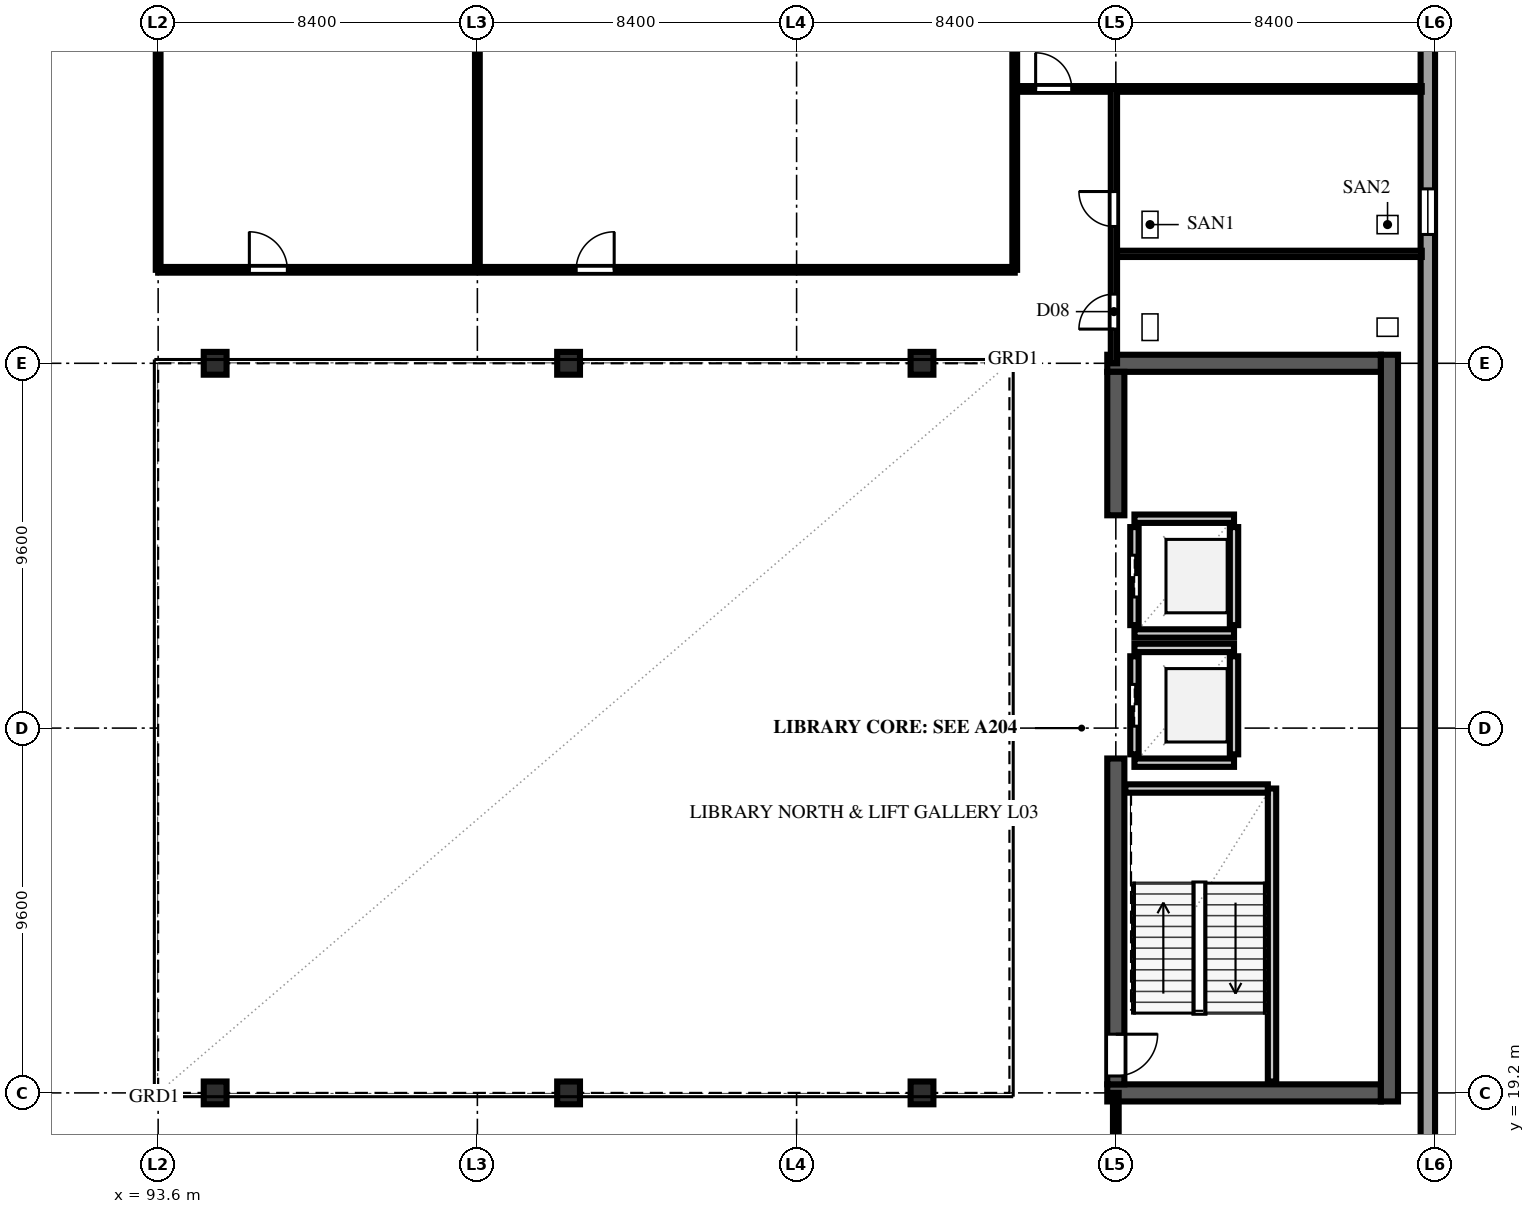
"""IFC4 building model, lengths in metres.
Left out: names, types, materials, properties, quantities, classifications, styles, units other than length and angle.
Written with IfcOpenShell. Run it as: python <this file> out.ifc"""

import sys

from ifc_helpers import new_model, si_unit, direction, frame, frame_2d, origin, origin_2d, place, context, subcontext, project, spatial, rectangle, extrude, element, fill, save


model = new_model("IFC4")
c1 = context("Model", 3, precision=1e-05, world=origin(), true_north=direction((0.0, 1.0)))
c2 = subcontext(c1, "Body", "Model", "MODEL_VIEW")
j1 = project(units=[si_unit("LENGTHUNIT", "METRE"), si_unit("PLANEANGLEUNIT", "RADIAN")], contexts=[c1])
p1 = place(None, origin())
s1 = spatial("IfcSite", under=j1, at=p1, CompositionType="ELEMENT")
p2 = place(p1, origin())
s2 = spatial("IfcBuilding", under=s1, at=p2, CompositionType="ELEMENT")
p3 = place(p2, frame((0.0, 0.0, 15.0)))
s3 = spatial("IfcBuildingStorey", under=s2, at=p3, CompositionType="ELEMENT", Elevation=15.0)
for number, where, z_axis, x_axis in (
    (1, (118.575, 19.2, 0.0), (0.0, 0.0, 1.0), (1.0, 0.0, 0.0)),
    (2, (118.575, 38.4, 0.0), (0.0, 0.0, 1.0), (1.0, 0.0, 0.0)),
):
    element("IfcWall", number, at=place(p3, frame(where, z_axis=z_axis, x_axis=x_axis)), inside=s3, PredefinedType="SHEAR", context=c2, shape_type="SweptSolid", body=[
        extrude(rectangle(XDim=7.2, YDim=0.45, at=frame_2d((3.6, 0.0))), origin(), (0.0, 0.0, 1.0), 4.25),
    ])
p4 = place(p3, frame((126.0, 18.975, 0.0), z_axis=(0.0, 0.0, 1.0), x_axis=(0.0, 1.0, 0.0)))
e3 = element("IfcWall", 3, at=p4, inside=s3, PredefinedType="SHEAR", context=c2, shape_type="SweptSolid", body=[
    extrude(rectangle(XDim=19.65, YDim=0.45, at=frame_2d((9.825, 0.0))), origin(), (0.0, 0.0, 1.0), 4.25),
])
p5 = place(p3, frame((118.8, 19.425, 0.0), z_axis=(0.0, 0.0, 1.0), x_axis=(0.0, 1.0, 0.0)))
e4 = element("IfcWall", 4, at=p5, inside=s3, PredefinedType="SHEAR", context=c2, shape_type="SweptSolid", body=[
    extrude(rectangle(XDim=8.575, YDim=0.45, at=frame_2d((4.288, 0.0))), origin(), (0.0, 0.0, 1.0), 4.25),
])
p6 = place(p5, frame((0.22, 0.0, 0.0)))
e5 = element("IfcOpeningElement", 5, at=p6, cuts=e4, PredefinedType="OPENING", context=c2, shape_type="SweptSolid", body=[
    extrude(rectangle(XDim=1.1, YDim=2.2, at=frame_2d((0.55, 1.1))), frame((0.0, 0.237, 0.0), z_axis=(0.0, -1.0, 0.0), x_axis=(1.0, 0.0, 0.0)), (0.0, 0.0, 1.0), 0.474),
])
p7 = place(p3, frame((118.8, 34.4, 0.0), z_axis=(0.0, 0.0, 1.0), x_axis=(0.0, 1.0, 0.0)))
e6 = element("IfcWall", 6, at=p7, inside=s3, PredefinedType="SHEAR", context=c2, shape_type="SweptSolid", body=[
    extrude(rectangle(XDim=3.775, YDim=0.45, at=frame_2d((1.888, 0.0))), origin(), (0.0, 0.0, 1.0), 4.25),
])
for number, where, z_axis, x_axis in (
    (7, (95.1, 19.2, 0.0), (0.0, 0.0, 1.0), (1.0, 0.0, 0.0)),
    (8, (95.1, 38.4, 0.0), (0.0, 0.0, 1.0), (1.0, 0.0, 0.0)),
    (9, (104.4, 19.2, 0.0), (0.0, 0.0, 1.0), (1.0, 0.0, 0.0)),
    (10, (104.4, 38.4, 0.0), (0.0, 0.0, 1.0), (1.0, 0.0, 0.0)),
    (11, (113.7, 19.2, 0.0), (0.0, 0.0, 1.0), (1.0, 0.0, 0.0)),
    (12, (113.7, 38.4, 0.0), (0.0, 0.0, 1.0), (1.0, 0.0, 0.0)),
):
    element("IfcColumn", number, at=place(p3, frame(where, z_axis=z_axis, x_axis=x_axis)), inside=s3, PredefinedType="COLUMN", context=c2, shape_type="SweptSolid", body=[
        extrude(rectangle(XDim=0.6, YDim=0.6, at=origin_2d()), origin(), (0.0, 0.0, 1.0), 4.6),
    ])
p8 = place(p3, frame((127.01, 0.19, 0.0), z_axis=(0.0, 0.0, 1.0), x_axis=(0.0, 1.0, 0.0)))
e13 = element("IfcWall", 13, at=p8, inside=s3, PredefinedType="SOLIDWALL", context=c2, shape_type="SweptSolid", body=[
    extrude(rectangle(XDim=57.22, YDim=0.38, at=frame_2d((28.61, 0.0))), origin(), (0.0, 0.0, 1.0), 4.25),
])
p9 = place(p8, frame((3.6, 0.0, 1.25)))
e14 = element("IfcOpeningElement", 14, at=p9, cuts=e13, PredefinedType="OPENING", context=c2, shape_type="SweptSolid", body=[
    extrude(rectangle(XDim=1.2, YDim=1.65, at=frame_2d((0.6, 0.825))), frame((0.0, 0.202, 0.0), z_axis=(0.0, -1.0, 0.0), x_axis=(1.0, 0.0, 0.0)), (0.0, 0.0, 1.0), 0.404),
])
p10 = place(p8, frame((11.2, 0.0, 1.25)))
e15 = element("IfcOpeningElement", 15, at=p10, cuts=e13, PredefinedType="OPENING", context=c2, shape_type="SweptSolid", body=[
    extrude(rectangle(XDim=1.2, YDim=1.65, at=frame_2d((0.6, 0.825))), frame((0.0, 0.202, 0.0), z_axis=(0.0, -1.0, 0.0), x_axis=(1.0, 0.0, 0.0)), (0.0, 0.0, 1.0), 0.404),
])
p11 = place(p8, frame((41.6, 0.0, 1.25)))
e16 = element("IfcOpeningElement", 16, at=p11, cuts=e13, PredefinedType="OPENING", context=c2, shape_type="SweptSolid", body=[
    extrude(rectangle(XDim=1.2, YDim=1.65, at=frame_2d((0.6, 0.825))), frame((0.0, 0.202, 0.0), z_axis=(0.0, -1.0, 0.0), x_axis=(1.0, 0.0, 0.0)), (0.0, 0.0, 1.0), 0.404),
])
p12 = place(p8, frame((49.2, 0.0, 1.25)))
e17 = element("IfcOpeningElement", 17, at=p12, cuts=e13, PredefinedType="OPENING", context=c2, shape_type="SweptSolid", body=[
    extrude(rectangle(XDim=1.2, YDim=1.65, at=frame_2d((0.6, 0.825))), frame((0.0, 0.202, 0.0), z_axis=(0.0, -1.0, 0.0), x_axis=(1.0, 0.0, 0.0)), (0.0, 0.0, 1.0), 0.404),
])
p13 = place(p3, frame((122.91, 19.5, 0.0), z_axis=(0.0, 0.0, 1.0), x_axis=(0.0, 1.0, 0.0)))
e18 = element("IfcWall", 18, at=p13, inside=s3, PredefinedType="SOLIDWALL", context=c2, shape_type="SweptSolid", body=[
    extrude(rectangle(XDim=7.71, YDim=0.22, at=frame_2d((3.855, 0.0))), origin(), (0.0, 0.0, 1.0), 4.25),
])
p14 = place(p3, frame((119.05, 27.21, 0.0), z_axis=(0.0, 0.0, 1.0), x_axis=(1.0, 0.0, 0.0)))
e19 = element("IfcWall", 19, at=p14, inside=s3, PredefinedType="SOLIDWALL", context=c2, shape_type="SweptSolid", body=[
    extrude(rectangle(XDim=3.75, YDim=0.22, at=frame_2d((1.875, 0.0))), origin(), (0.0, 0.0, 1.0), 4.25),
])
p15 = place(p3, frame((119.29, 28.11, 0.0), z_axis=(0.0, 0.0, 1.0), x_axis=(0.0, 1.0, 0.0)))
e20 = element("IfcWall", 20, at=p15, inside=s3, PredefinedType="SOLIDWALL", context=c2, shape_type="SweptSolid", body=[
    extrude(rectangle(XDim=2.58, YDim=0.22, at=frame_2d((1.29, 0.0))), origin(), (0.0, 0.0, 1.0), 4.25),
])
p16 = place(p15, frame((0.74, 0.0, 0.0)))
e21 = element("IfcOpeningElement", 21, at=p16, cuts=e20, PredefinedType="OPENING", context=c2, shape_type="SweptSolid", body=[
    extrude(rectangle(XDim=1.1, YDim=2.2, at=frame_2d((0.55, 1.1))), frame((0.0, 0.122, 0.0), z_axis=(0.0, -1.0, 0.0), x_axis=(1.0, 0.0, 0.0)), (0.0, 0.0, 1.0), 0.244),
])
p17 = place(p3, frame((121.91, 28.11, 0.0), z_axis=(0.0, 0.0, 1.0), x_axis=(0.0, 1.0, 0.0)))
e22 = element("IfcWall", 22, at=p17, inside=s3, PredefinedType="SOLIDWALL", context=c2, shape_type="SweptSolid", body=[
    extrude(rectangle(XDim=2.58, YDim=0.22, at=frame_2d((1.29, 0.0))), origin(), (0.0, 0.0, 1.0), 4.25),
])
for number, where, z_axis, x_axis in (
    (23, (119.29, 27.89, 0.0), (0.0, 0.0, 1.0), (1.0, 0.0, 0.0)),
    (24, (119.29, 30.91, 0.0), (0.0, 0.0, 1.0), (1.0, 0.0, 0.0)),
):
    element("IfcWall", number, at=place(p3, frame(where, z_axis=z_axis, x_axis=x_axis)), inside=s3, PredefinedType="SOLIDWALL", context=c2, shape_type="SweptSolid", body=[
        extrude(rectangle(XDim=2.62, YDim=0.22, at=frame_2d((1.31, 0.0))), origin(), (0.0, 0.0, 1.0), 4.25),
    ])
p18 = place(p3, frame((119.29, 31.51, 0.0), z_axis=(0.0, 0.0, 1.0), x_axis=(0.0, 1.0, 0.0)))
e25 = element("IfcWall", 25, at=p18, inside=s3, PredefinedType="SOLIDWALL", context=c2, shape_type="SweptSolid", body=[
    extrude(rectangle(XDim=2.58, YDim=0.22, at=frame_2d((1.29, 0.0))), origin(), (0.0, 0.0, 1.0), 4.25),
])
p19 = place(p18, frame((0.74, 0.0, 0.0)))
e26 = element("IfcOpeningElement", 26, at=p19, cuts=e25, PredefinedType="OPENING", context=c2, shape_type="SweptSolid", body=[
    extrude(rectangle(XDim=1.1, YDim=2.2, at=frame_2d((0.55, 1.1))), frame((0.0, 0.122, 0.0), z_axis=(0.0, -1.0, 0.0), x_axis=(1.0, 0.0, 0.0)), (0.0, 0.0, 1.0), 0.244),
])
p20 = place(p3, frame((121.91, 31.51, 0.0), z_axis=(0.0, 0.0, 1.0), x_axis=(0.0, 1.0, 0.0)))
e27 = element("IfcWall", 27, at=p20, inside=s3, PredefinedType="SOLIDWALL", context=c2, shape_type="SweptSolid", body=[
    extrude(rectangle(XDim=2.58, YDim=0.22, at=frame_2d((1.29, 0.0))), origin(), (0.0, 0.0, 1.0), 4.25),
])
for number, where, z_axis, x_axis in (
    (28, (119.29, 31.29, 0.0), (0.0, 0.0, 1.0), (1.0, 0.0, 0.0)),
    (29, (119.29, 34.31, 0.0), (0.0, 0.0, 1.0), (1.0, 0.0, 0.0)),
):
    element("IfcWall", number, at=place(p3, frame(where, z_axis=z_axis, x_axis=x_axis)), inside=s3, PredefinedType="SOLIDWALL", context=c2, shape_type="SweptSolid", body=[
        extrude(rectangle(XDim=2.62, YDim=0.22, at=frame_2d((1.31, 0.0))), origin(), (0.0, 0.0, 1.0), 4.25),
    ])
p21 = place(p3, frame((118.8, 16.74, 0.0), z_axis=(0.0, 0.0, 1.0), x_axis=(0.0, 1.0, 0.0)))
e30 = element("IfcWall", 30, at=p21, inside=s3, PredefinedType="PARTITIONING", context=c2, shape_type="SweptSolid", body=[
    extrude(rectangle(XDim=2.46, YDim=0.15, at=frame_2d((1.23, 0.0))), origin(), (0.0, 0.0, 1.0), 4.25),
])
for number, where, z_axis, x_axis in (
    (31, (93.6, 40.86, 0.0), (0.0, 0.0, 1.0), (0.0, 1.0, 0.0)),
    (32, (102.0, 40.86, 0.0), (0.0, 0.0, 1.0), (0.0, 1.0, 0.0)),
    (33, (116.14, 40.86, 0.0), (0.0, 0.0, 1.0), (0.0, 1.0, 0.0)),
):
    element("IfcWall", number, at=place(p3, frame(where, z_axis=z_axis, x_axis=x_axis)), inside=s3, PredefinedType="PARTITIONING", context=c2, shape_type="SweptSolid", body=[
        extrude(rectangle(XDim=16.39, YDim=0.125, at=frame_2d((8.195, 0.0))), origin(), (0.0, 0.0, 1.0), 4.25),
    ])
p22 = place(p3, frame((93.6, 40.86, 0.0), z_axis=(0.0, 0.0, 1.0), x_axis=(1.0, 0.0, 0.0)))
e34 = element("IfcWall", 34, at=p22, inside=s3, PredefinedType="PARTITIONING", context=c2, shape_type="SweptSolid", body=[
    extrude(rectangle(XDim=22.54, YDim=0.15, at=frame_2d((11.27, 0.0))), origin(), (0.0, 0.0, 1.0), 4.25),
])
p23 = place(p22, frame((2.4, 0.0, 0.0)))
e35 = element("IfcOpeningElement", 35, at=p23, cuts=e34, PredefinedType="OPENING", context=c2, shape_type="SweptSolid", body=[
    extrude(rectangle(XDim=1.0, YDim=2.2, at=frame_2d((0.5, 1.1))), frame((0.0, 0.087, 0.0), z_axis=(0.0, -1.0, 0.0), x_axis=(1.0, 0.0, 0.0)), (0.0, 0.0, 1.0), 0.174),
])
p24 = place(p22, frame((11.0, 0.0, 0.0)))
e36 = element("IfcOpeningElement", 36, at=p24, cuts=e34, PredefinedType="OPENING", context=c2, shape_type="SweptSolid", body=[
    extrude(rectangle(XDim=1.0, YDim=2.2, at=frame_2d((0.5, 1.1))), frame((0.0, 0.087, 0.0), z_axis=(0.0, -1.0, 0.0), x_axis=(1.0, 0.0, 0.0)), (0.0, 0.0, 1.0), 0.174),
])
p25 = place(p3, frame((118.75, 41.28, 0.0), z_axis=(0.0, 0.0, 1.0), x_axis=(1.0, 0.0, 0.0)))
e37 = element("IfcWall", 37, at=p25, inside=s3, PredefinedType="PLUMBINGWALL", context=c2, shape_type="SweptSolid", body=[
    extrude(rectangle(XDim=8.1, YDim=0.165, at=frame_2d((4.05, 0.0))), origin(), (0.0, 0.0, 1.0), 4.25),
])
p26 = place(p3, frame((116.14, 45.62, 0.0), z_axis=(0.0, 0.0, 1.0), x_axis=(1.0, 0.0, 0.0)))
e38 = element("IfcWall", 38, at=p26, inside=s3, PredefinedType="PARTITIONING", context=c2, shape_type="SweptSolid", body=[
    extrude(rectangle(XDim=10.71, YDim=0.15, at=frame_2d((5.355, 0.0))), origin(), (0.0, 0.0, 1.0), 4.25),
])
p27 = place(p26, frame((0.55, 0.0, 0.0)))
e39 = element("IfcOpeningElement", 39, at=p27, cuts=e38, PredefinedType="OPENING", context=c2, shape_type="SweptSolid", body=[
    extrude(rectangle(XDim=0.95, YDim=2.15, at=frame_2d((0.475, 1.075))), frame((0.0, 0.087, 0.0), z_axis=(0.0, -1.0, 0.0), x_axis=(1.0, 0.0, 0.0)), (0.0, 0.0, 1.0), 0.174),
])
p28 = place(p3, frame((118.75, 38.4, 0.0), z_axis=(0.0, 0.0, 1.0), x_axis=(0.0, 1.0, 0.0)))
e40 = element("IfcWall", 40, at=p28, inside=s3, PredefinedType="PLUMBINGWALL", context=c2, shape_type="SweptSolid", body=[
    extrude(rectangle(XDim=7.22, YDim=0.165, at=frame_2d((3.61, 0.0))), origin(), (0.0, 0.0, 1.0), 4.25),
])
p29 = place(p28, frame((0.9, 0.0, 0.0)))
e41 = element("IfcOpeningElement", 41, at=p29, cuts=e40, PredefinedType="OPENING", context=c2, shape_type="SweptSolid", body=[
    extrude(rectangle(XDim=0.92, YDim=2.15, at=frame_2d((0.46, 1.075))), frame((0.0, 0.094, 0.0), z_axis=(0.0, -1.0, 0.0), x_axis=(1.0, 0.0, 0.0)), (0.0, 0.0, 1.0), 0.189),
])
p30 = place(p28, frame((3.6, 0.0, 0.0)))
e42 = element("IfcOpeningElement", 42, at=p30, cuts=e40, PredefinedType="OPENING", context=c2, shape_type="SweptSolid", body=[
    extrude(rectangle(XDim=0.92, YDim=2.15, at=frame_2d((0.46, 1.075))), frame((0.0, 0.094, 0.0), z_axis=(0.0, -1.0, 0.0), x_axis=(1.0, 0.0, 0.0)), (0.0, 0.0, 1.0), 0.189),
])
p31 = place(p11, origin())
e43 = element("IfcWindow", 43, at=p31, inside=s3, PartitioningType="SINGLE_PANEL", PredefinedType="WINDOW", context=c2, shape_type="SweptSolid", body=[
    extrude(rectangle(XDim=1.2, YDim=1.65, at=frame_2d((0.6, 0.825))), frame((0.0, 0.11, 0.0), z_axis=(0.0, -1.0, 0.0), x_axis=(1.0, 0.0, 0.0)), (0.0, 0.0, 1.0), 0.06),
])
fill(e16, e43)
p32 = place(p6, frame((1.1, 0.0, 0.0), z_axis=(0.0, 0.0, 1.0), x_axis=(-1.0, 0.0, 0.0)))
e44 = element("IfcDoor", 44, at=p32, inside=s3, OperationType="SINGLE_SWING_LEFT", PredefinedType="DOOR", context=c2, shape_type="SweptSolid", body=[
    extrude(rectangle(XDim=1.1, YDim=2.2, at=frame_2d((0.55, 1.1))), frame((0.0, 0.025, 0.0), z_axis=(0.0, -1.0, 0.0), x_axis=(1.0, 0.0, 0.0)), (0.0, 0.0, 1.0), 0.05),
])
fill(e5, e44)
p33 = place(p16, origin())
e45 = element("IfcDoor", 45, at=p33, inside=s3, OperationType="DOUBLE_DOOR_SLIDING", PredefinedType="DOOR", context=c2, shape_type="SweptSolid", body=[
    extrude(rectangle(XDim=1.1, YDim=2.2, at=frame_2d((0.55, 1.1))), frame((0.0, 0.025, 0.0), z_axis=(0.0, -1.0, 0.0), x_axis=(1.0, 0.0, 0.0)), (0.0, 0.0, 1.0), 0.05),
])
fill(e21, e45)
p34 = place(p19, origin())
e46 = element("IfcDoor", 46, at=p34, inside=s3, OperationType="DOUBLE_DOOR_SLIDING", PredefinedType="DOOR", context=c2, shape_type="SweptSolid", body=[
    extrude(rectangle(XDim=1.1, YDim=2.2, at=frame_2d((0.55, 1.1))), frame((0.0, 0.025, 0.0), z_axis=(0.0, -1.0, 0.0), x_axis=(1.0, 0.0, 0.0)), (0.0, 0.0, 1.0), 0.05),
])
fill(e26, e46)
p35 = place(p23, origin())
e47 = element("IfcDoor", 47, at=p35, inside=s3, OperationType="SINGLE_SWING_LEFT", PredefinedType="DOOR", context=c2, shape_type="SweptSolid", body=[
    extrude(rectangle(XDim=1.0, YDim=2.2, at=frame_2d((0.5, 1.1))), frame((0.0, 0.025, 0.0), z_axis=(0.0, -1.0, 0.0), x_axis=(1.0, 0.0, 0.0)), (0.0, 0.0, 1.0), 0.05),
])
fill(e35, e47)
p36 = place(p24, origin())
e48 = element("IfcDoor", 48, at=p36, inside=s3, OperationType="SINGLE_SWING_RIGHT", PredefinedType="DOOR", context=c2, shape_type="SweptSolid", body=[
    extrude(rectangle(XDim=1.0, YDim=2.2, at=frame_2d((0.5, 1.1))), frame((0.0, 0.025, 0.0), z_axis=(0.0, -1.0, 0.0), x_axis=(1.0, 0.0, 0.0)), (0.0, 0.0, 1.0), 0.05),
])
fill(e36, e48)
p37 = place(p27, origin())
e49 = element("IfcDoor", 49, at=p37, inside=s3, OperationType="SINGLE_SWING_LEFT", PredefinedType="DOOR", context=c2, shape_type="SweptSolid", body=[
    extrude(rectangle(XDim=0.95, YDim=2.15, at=frame_2d((0.475, 1.075))), frame((0.0, 0.025, 0.0), z_axis=(0.0, -1.0, 0.0), x_axis=(1.0, 0.0, 0.0)), (0.0, 0.0, 1.0), 0.05),
])
fill(e39, e49)
p38 = place(p29, origin())
e50 = element("IfcDoor", 50, at=p38, inside=s3, OperationType="SINGLE_SWING_LEFT", PredefinedType="DOOR", context=c2, shape_type="SweptSolid", body=[
    extrude(rectangle(XDim=0.92, YDim=2.15, at=frame_2d((0.46, 1.075))), frame((0.0, 0.025, 0.0), z_axis=(0.0, -1.0, 0.0), x_axis=(1.0, 0.0, 0.0)), (0.0, 0.0, 1.0), 0.05),
])
fill(e41, e50)
p39 = place(p30, origin())
e51 = element("IfcDoor", 51, at=p39, inside=s3, OperationType="SINGLE_SWING_RIGHT", PredefinedType="DOOR", context=c2, shape_type="SweptSolid", body=[
    extrude(rectangle(XDim=0.92, YDim=2.15, at=frame_2d((0.46, 1.075))), frame((0.0, 0.025, 0.0), z_axis=(0.0, -1.0, 0.0), x_axis=(1.0, 0.0, 0.0)), (0.0, 0.0, 1.0), 0.05),
])
fill(e42, e51)
save(model, sys.argv[1])
